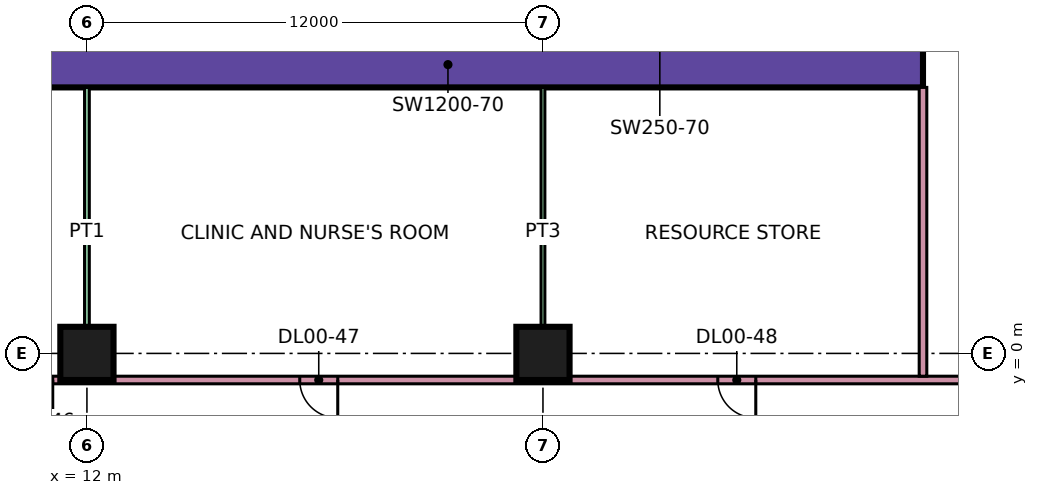
"""IFC4 building model, lengths in metres.
Left out: names, types, materials, properties, quantities, classifications, styles, units other than length and angle.
Written with IfcOpenShell. Run it as: python <this file> out.ifc"""

import sys

from ifc_helpers import new_model, si_unit, direction, frame, frame_2d, origin, origin_2d, place, context, subcontext, project, spatial, rectangle, extrude, element, fill, save


model = new_model("IFC4")
c1 = context("Model", 3, precision=1e-05, world=origin(), true_north=direction((0.0, 1.0)))
c2 = subcontext(c1, "Body", "Model", "MODEL_VIEW")
j1 = project(units=[si_unit("LENGTHUNIT", "METRE"), si_unit("PLANEANGLEUNIT", "RADIAN")], contexts=[c1])
p1 = place(None, origin())
s1 = spatial("IfcSite", under=j1, at=p1, CompositionType="ELEMENT")
p2 = place(p1, origin())
s2 = spatial("IfcBuilding", under=s1, at=p2, CompositionType="ELEMENT")
p3 = place(p2, origin())
s3 = spatial("IfcBuildingStorey", under=s2, at=p3, CompositionType="ELEMENT", Elevation=0.0)
for number, where, z_axis, x_axis in (
    (1, (12.0, 0.0, 0.0), (0.0, 0.0, 1.0), (1.0, 0.0, 0.0)),
    (2, (24.0, 0.0, 0.0), (0.0, 0.0, 1.0), (1.0, 0.0, 0.0)),
):
    element("IfcColumn", number, at=place(p3, frame(where, z_axis=z_axis, x_axis=x_axis)), inside=s3, PredefinedType="COLUMN", context=c2, shape_type="SweptSolid", body=[
        extrude(rectangle(XDim=1.4, YDim=1.4, at=origin_2d()), origin(), (0.0, 0.0, 1.0), 7.2),
    ])
p4 = place(p3, frame((9.0, 7.6, 0.0), z_axis=(0.0, 0.0, 1.0), x_axis=(1.0, 0.0, 0.0)))
e3 = element("IfcWall", 3, at=p4, inside=s3, PredefinedType="SHEAR", context=c2, shape_type="SweptSolid", body=[
    extrude(rectangle(XDim=25.0, YDim=1.2, at=frame_2d((12.5, 0.0))), origin(), (0.0, 0.0, 1.0), 7.2),
])
p5 = place(p3, frame((-0.8, -0.7, 0.0), z_axis=(0.0, 0.0, 1.0), x_axis=(1.0, 0.0, 0.0)))
e4 = element("IfcWall", 4, at=p5, inside=s3, PredefinedType="PARTITIONING", context=c2, shape_type="SweptSolid", body=[
    extrude(rectangle(XDim=46.5, YDim=0.2, at=frame_2d((23.25, 0.0))), origin(), (0.0, 0.0, 1.0), 6.8),
])
p6 = place(p5, frame((39.85, 0.0, 0.0)))
e5 = element("IfcOpeningElement", 5, at=p6, cuts=e4, PredefinedType="OPENING", context=c2, shape_type="SweptSolid", body=[
    extrude(rectangle(XDim=1.8, YDim=2.1, at=frame_2d((0.9, 1.05))), frame((0.0, 0.11, 0.0), z_axis=(0.0, -1.0, 0.0), x_axis=(1.0, 0.0, 0.0)), (0.0, 0.0, 1.0), 0.22),
])
p7 = place(p5, frame((5.9, 0.0, 0.0)))
e6 = element("IfcOpeningElement", 6, at=p7, cuts=e4, PredefinedType="OPENING", context=c2, shape_type="SweptSolid", body=[
    extrude(rectangle(XDim=1.0, YDim=2.1, at=frame_2d((0.5, 1.05))), frame((0.0, 0.11, 0.0), z_axis=(0.0, -1.0, 0.0), x_axis=(1.0, 0.0, 0.0)), (0.0, 0.0, 1.0), 0.22),
])
p8 = place(p5, frame((10.9, 0.0, 0.0)))
e7 = element("IfcOpeningElement", 7, at=p8, cuts=e4, PredefinedType="OPENING", context=c2, shape_type="SweptSolid", body=[
    extrude(rectangle(XDim=1.0, YDim=2.1, at=frame_2d((0.5, 1.05))), frame((0.0, 0.11, 0.0), z_axis=(0.0, -1.0, 0.0), x_axis=(1.0, 0.0, 0.0)), (0.0, 0.0, 1.0), 0.22),
])
p9 = place(p5, frame((18.4, 0.0, 0.0)))
e8 = element("IfcOpeningElement", 8, at=p9, cuts=e4, PredefinedType="OPENING", context=c2, shape_type="SweptSolid", body=[
    extrude(rectangle(XDim=1.0, YDim=2.1, at=frame_2d((0.5, 1.05))), frame((0.0, 0.11, 0.0), z_axis=(0.0, -1.0, 0.0), x_axis=(1.0, 0.0, 0.0)), (0.0, 0.0, 1.0), 0.22),
])
p10 = place(p5, frame((29.4, 0.0, 0.0)))
e9 = element("IfcOpeningElement", 9, at=p10, cuts=e4, PredefinedType="OPENING", context=c2, shape_type="SweptSolid", body=[
    extrude(rectangle(XDim=1.0, YDim=2.1, at=frame_2d((0.5, 1.05))), frame((0.0, 0.11, 0.0), z_axis=(0.0, -1.0, 0.0), x_axis=(1.0, 0.0, 0.0)), (0.0, 0.0, 1.0), 0.22),
])
p11 = place(p3, frame((12.0, -0.6, 0.0), z_axis=(0.0, 0.0, 1.0), x_axis=(0.0, 1.0, 0.0)))
e10 = element("IfcWall", 10, at=p11, inside=s3, PredefinedType="PARTITIONING", context=c2, shape_type="SweptSolid", body=[
    extrude(rectangle(XDim=7.6, YDim=0.125, at=frame_2d((3.8, 0.0))), origin(), (0.0, 0.0, 1.0), 6.8),
])
p12 = place(p3, frame((24.0, -0.6, 0.0), z_axis=(0.0, 0.0, 1.0), x_axis=(0.0, 1.0, 0.0)))
e11 = element("IfcWall", 11, at=p12, inside=s3, PredefinedType="PARTITIONING", context=c2, shape_type="SweptSolid", body=[
    extrude(rectangle(XDim=7.6, YDim=0.1, at=frame_2d((3.8, 0.0))), origin(), (0.0, 0.0, 1.0), 6.8),
])
p13 = place(p3, frame((34.0, -0.6, 0.0), z_axis=(0.0, 0.0, 1.0), x_axis=(0.0, 1.0, 0.0)))
e12 = element("IfcWall", 12, at=p13, inside=s3, PredefinedType="PARTITIONING", context=c2, shape_type="SweptSolid", body=[
    extrude(rectangle(XDim=7.6, YDim=0.2, at=frame_2d((3.8, 0.0))), origin(), (0.0, 0.0, 1.0), 6.8),
])
p14 = place(p8, origin())
e13 = element("IfcDoor", 13, at=p14, inside=s3, OperationType="SINGLE_SWING_RIGHT", PredefinedType="DOOR", context=c2, shape_type="SweptSolid", body=[
    extrude(rectangle(XDim=1.0, YDim=2.1, at=frame_2d((0.5, 1.05))), frame((0.0, 0.025, 0.0), z_axis=(0.0, -1.0, 0.0), x_axis=(1.0, 0.0, 0.0)), (0.0, 0.0, 1.0), 0.05),
])
fill(e7, e13)
p15 = place(p9, origin())
e14 = element("IfcDoor", 14, at=p15, inside=s3, OperationType="SINGLE_SWING_RIGHT", PredefinedType="DOOR", context=c2, shape_type="SweptSolid", body=[
    extrude(rectangle(XDim=1.0, YDim=2.1, at=frame_2d((0.5, 1.05))), frame((0.0, 0.025, 0.0), z_axis=(0.0, -1.0, 0.0), x_axis=(1.0, 0.0, 0.0)), (0.0, 0.0, 1.0), 0.05),
])
fill(e8, e14)
p16 = place(p10, origin())
e15 = element("IfcDoor", 15, at=p16, inside=s3, OperationType="SINGLE_SWING_RIGHT", PredefinedType="DOOR", context=c2, shape_type="SweptSolid", body=[
    extrude(rectangle(XDim=1.0, YDim=2.1, at=frame_2d((0.5, 1.05))), frame((0.0, 0.025, 0.0), z_axis=(0.0, -1.0, 0.0), x_axis=(1.0, 0.0, 0.0)), (0.0, 0.0, 1.0), 0.05),
])
fill(e9, e15)
save(model, sys.argv[1])
